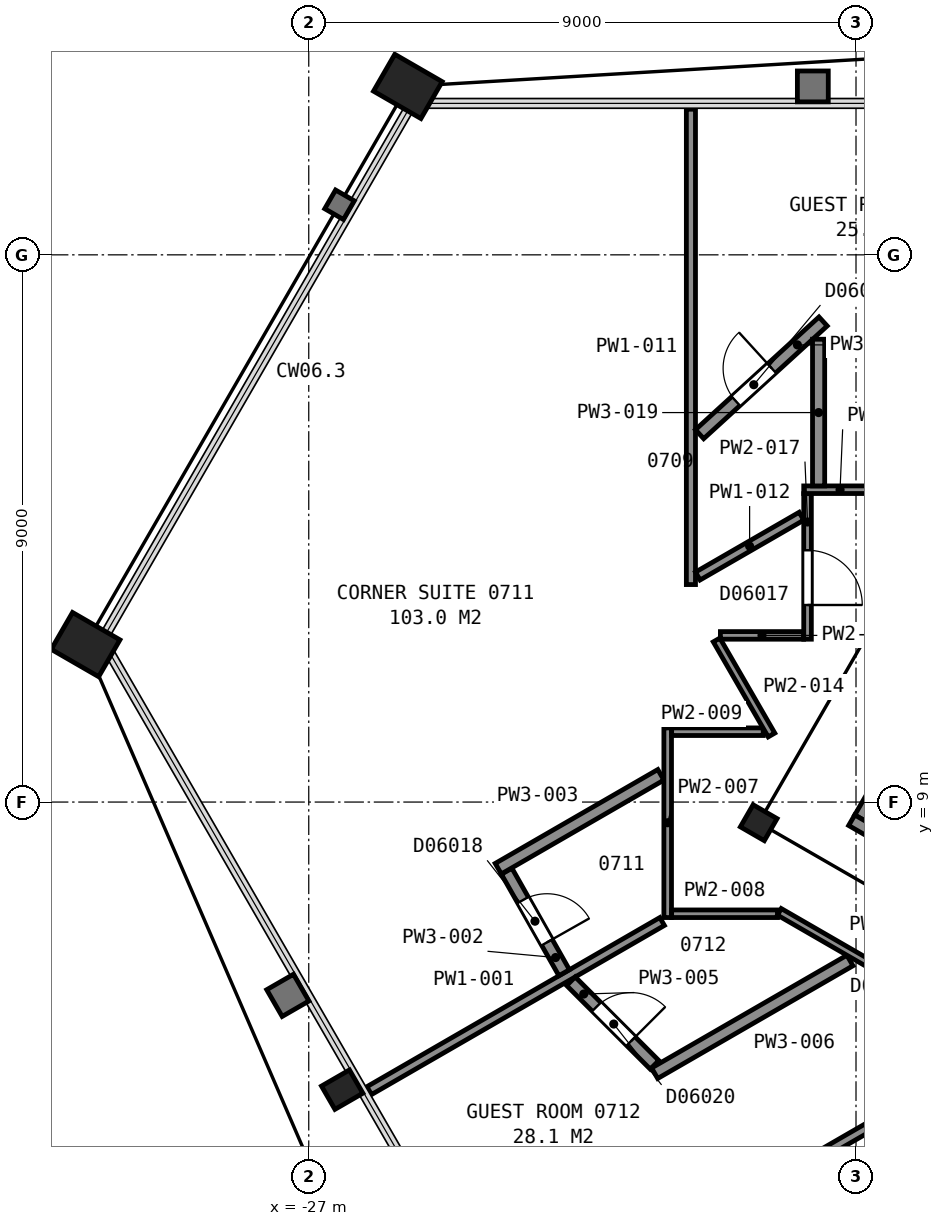
"""IFC4 building model, lengths in metres.
Left out: names, types, materials, properties, quantities, classifications, styles, units other than length and angle.
Written with IfcOpenShell. Run it as: python <this file> out.ifc"""

import sys

from ifc_helpers import new_model, si_unit, direction, frame, frame_2d, origin, origin_2d, place, context, subcontext, project, spatial, rectangle, hollow_rectangle, i_section, extrude, element, fill, save


model = new_model("IFC4")
c1 = context("Model", 3, precision=1e-05, world=origin(), true_north=direction((0.0, 1.0)))
c2 = subcontext(c1, "Body", "Model", "MODEL_VIEW")
j1 = project(units=[si_unit("LENGTHUNIT", "METRE"), si_unit("PLANEANGLEUNIT", "RADIAN")], contexts=[c1])
p1 = place(None, origin())
s1 = spatial("IfcSite", under=j1, at=p1, CompositionType="ELEMENT")
p2 = place(p1, origin())
s2 = spatial("IfcBuilding", under=s1, at=p2, CompositionType="ELEMENT")
p3 = place(p2, frame((0.0, 0.0, 40.4)))
s3 = spatial("IfcBuildingStorey", under=s2, at=p3, CompositionType="ELEMENT", Elevation=40.4)
for number, where, z_axis, x_axis in (
    (1, (-25.37, 20.77, 0.0), (0.0, 0.0, 1.0), (0.5, 0.866, 0.0)),
    (2, (-30.67, 11.59, 0.0), (0.0, 0.0, 1.0), (0.5, 0.866, 0.0)),
):
    element("IfcColumn", number, at=place(p3, frame(where, z_axis=z_axis, x_axis=x_axis)), inside=s3, PredefinedType="COLUMN", context=c2, shape_type="SweptSolid", body=[
        extrude(hollow_rectangle(XDim=0.7, YDim=0.9, WallThickness=0.065, at=origin_2d()), origin(), (0.0, 0.0, 1.0), 3.56),
    ])
p4 = place(p3, frame((-26.45, 4.27, 0.0), z_axis=(0.0, 0.0, 1.0), x_axis=(-0.5, 0.866025403784, 0.0)))
e3 = element("IfcColumn", 3, at=p4, inside=s3, PredefinedType="COLUMN", context=c2, shape_type="SweptSolid", body=[
    extrude(i_section(OverallWidth=0.442, OverallDepth=0.531, WebThickness=0.066, FlangeThickness=0.106, FilletRadius=0.015, at=origin_2d()), origin(), (0.0, 0.0, 1.0), 3.575),
])
p5 = place(p3, frame((-19.6, 8.66, 0.0), z_axis=(0.0, 0.0, 1.0), x_axis=(0.5, 0.866025403784, 0.0)))
e4 = element("IfcColumn", 4, at=p5, inside=s3, PredefinedType="COLUMN", context=c2, shape_type="SweptSolid", body=[
    extrude(i_section(OverallWidth=0.419, OverallDepth=0.455, WebThickness=0.042, FlangeThickness=0.068, FilletRadius=0.015, at=origin_2d()), origin(), (0.0, 0.0, 1.0), 3.6),
])
p6 = place(p3, frame((-16.534, 11.162, 0.0), z_axis=(0.0, 0.0, 1.0), x_axis=(-0.49998411664, -0.866034573852, 0.0)))
e5 = element("IfcWall", 5, at=p6, inside=s3, PredefinedType="PARTITIONING", context=c2, shape_type="SweptSolid", body=[
    extrude(rectangle(XDim=2.8, YDim=0.2, at=frame_2d((1.4, 0.0))), origin(), (0.0, 0.0, 1.0), 3.35),
])
p7 = place(p6, frame((0.85, 0.0, 0.0)))
e6 = element("IfcOpeningElement", 6, at=p7, cuts=e5, PredefinedType="OPENING", context=c2, shape_type="SweptSolid", body=[
    extrude(rectangle(XDim=1.1, YDim=2.1, at=frame_2d((0.55, 1.05))), frame((0.0, 0.11, 0.0), z_axis=(0.0, -1.0, 0.0), x_axis=(1.0, 0.0, 0.0)), (0.0, 0.0, 1.0), 0.22),
])
p8 = place(p3, frame((-7.678, 2.701, 0.0), z_axis=(0.0, 0.0, 1.0), x_axis=(-0.866026010844, 0.49999894854, 0.0)))
e7 = element("IfcWall", 7, at=p8, inside=s3, PredefinedType="PARTITIONING", context=c2, shape_type="SweptSolid", body=[
    extrude(rectangle(XDim=12.0, YDim=0.2, at=frame_2d((6.0, 0.0))), origin(), (0.0, 0.0, 1.0), 3.35),
])
p9 = place(p3, frame((-26.006, 4.254, 0.0), z_axis=(0.0, 0.0, 1.0), x_axis=(0.865981654797, 0.500075767815, 0.0)))
e8 = element("IfcWall", 8, at=p9, inside=s3, PredefinedType="PARTITIONING", context=c2, shape_type="SweptSolid", body=[
    extrude(rectangle(XDim=5.563, YDim=0.15, at=frame_2d((2.781, 0.0))), origin(), (0.0, 0.0, 1.0), 2.613),
])
p10 = place(p3, frame((-23.745, 7.863, 0.0), z_axis=(0.0, 0.0, 1.0), x_axis=(0.492970842961, -0.870045830971, 0.0)))
e9 = element("IfcWall", 9, at=p10, inside=s3, PredefinedType="PARTITIONING", context=c2, shape_type="SweptSolid", body=[
    extrude(rectangle(XDim=1.919, YDim=0.2, at=frame_2d((0.959, 0.0))), origin(), (0.0, 0.0, 1.0), 2.613),
])
p11 = place(p10, frame((0.545, 0.0, 0.0)))
e10 = element("IfcOpeningElement", 10, at=p11, cuts=e9, PredefinedType="OPENING", context=c2, shape_type="SweptSolid", body=[
    extrude(rectangle(XDim=0.8, YDim=2.1, at=frame_2d((0.4, 1.05))), frame((0.0, 0.11, 0.0), z_axis=(0.0, -1.0, 0.0), x_axis=(1.0, 0.0, 0.0)), (0.0, 0.0, 1.0), 0.22),
])
p12 = place(p3, frame((-23.884, 7.904, 0.0), z_axis=(0.0, 0.0, 1.0), x_axis=(0.866015731669, 0.500016752221, 0.0)))
e11 = element("IfcWall", 11, at=p12, inside=s3, PredefinedType="PARTITIONING", context=c2, shape_type="SweptSolid", body=[
    extrude(rectangle(XDim=3.088, YDim=0.2, at=frame_2d((1.544, 0.0))), origin(), (0.0, 0.0, 1.0), 2.613),
])
p13 = place(p3, frame((-23.693, 0.247, 0.0), z_axis=(0.0, 0.0, 1.0), x_axis=(0.866031705461, 0.499989085017, 0.0)))
e12 = element("IfcWall", 12, at=p13, inside=s3, PredefinedType="PARTITIONING", context=c2, shape_type="SweptSolid", body=[
    extrude(rectangle(XDim=8.587, YDim=0.15, at=frame_2d((4.293, 0.0))), origin(), (0.0, 0.0, 1.0), 2.613),
])
p14 = place(p3, frame((-22.688, 6.053, 0.0), z_axis=(0.0, 0.0, 1.0), x_axis=(0.707106781187, -0.707106781187, 0.0)))
e13 = element("IfcWall", 13, at=p14, inside=s3, PredefinedType="PARTITIONING", context=c2, shape_type="SweptSolid", body=[
    extrude(rectangle(XDim=1.944, YDim=0.2, at=frame_2d((0.972, 0.0))), origin(), (0.0, 0.0, 1.0), 2.613),
])
p15 = place(p14, frame((0.595, 0.0, 0.0)))
e14 = element("IfcOpeningElement", 14, at=p15, cuts=e13, PredefinedType="OPENING", context=c2, shape_type="SweptSolid", body=[
    extrude(rectangle(XDim=0.8, YDim=2.1, at=frame_2d((0.4, 1.05))), frame((0.0, 0.11, 0.0), z_axis=(0.0, -1.0, 0.0), x_axis=(1.0, 0.0, 0.0)), (0.0, 0.0, 1.0), 0.22),
])
p16 = place(p3, frame((-21.312, 4.54, 0.0), z_axis=(0.0, 0.0, 1.0), x_axis=(0.866071583234, 0.499920006315, 0.0)))
e15 = element("IfcWall", 15, at=p16, inside=s3, PredefinedType="PARTITIONING", context=c2, shape_type="SweptSolid", body=[
    extrude(rectangle(XDim=3.708, YDim=0.2, at=frame_2d((1.854, 0.0))), origin(), (0.0, 0.0, 1.0), 2.613),
])
p17 = place(p3, frame((-21.097, 7.101, 0.0), z_axis=(0.0, 0.0, 1.0), x_axis=(0.0, 1.0, 0.0)))
e16 = element("IfcWall", 16, at=p17, inside=s3, PredefinedType="PARTITIONING", context=c2, shape_type="SweptSolid", body=[
    extrude(rectangle(XDim=3.119, YDim=0.125, at=frame_2d((1.56, 0.0))), origin(), (0.0, 0.0, 1.0), 2.613),
])
p18 = place(p3, frame((-21.032, 7.163, 0.0), z_axis=(0.0, 0.0, 1.0), x_axis=(1.0, 0.0, 0.0)))
e17 = element("IfcWall", 17, at=p18, inside=s3, PredefinedType="PARTITIONING", context=c2, shape_type="SweptSolid", body=[
    extrude(rectangle(XDim=1.741, YDim=0.125, at=frame_2d((0.871, 0.0))), origin(), (0.0, 0.0, 1.0), 2.613),
])
p19 = place(p3, frame((-21.032, 10.157, 0.0), z_axis=(0.0, 0.0, 1.0), x_axis=(1.0, 0.0, 0.0)))
e18 = element("IfcWall", 18, at=p19, inside=s3, PredefinedType="PARTITIONING", context=c2, shape_type="SweptSolid", body=[
    extrude(rectangle(XDim=1.506, YDim=0.125, at=frame_2d((0.753, 0.0))), origin(), (0.0, 0.0, 1.0), 2.613),
])
p20 = place(p3, frame((-20.715, 12.577, 0.0), z_axis=(0.0, 0.0, 1.0), x_axis=(0.0, 1.0, 0.0)))
e19 = element("IfcWall", 19, at=p20, inside=s3, PredefinedType="PARTITIONING", context=c2, shape_type="SweptSolid", body=[
    extrude(rectangle(XDim=7.818, YDim=0.15, at=frame_2d((3.909, 0.0))), origin(), (0.0, 0.0, 1.0), 2.613),
])
p21 = place(p3, frame((-20.602, 12.717, 0.0), z_axis=(0.0, 0.0, 1.0), x_axis=(0.866121584746, 0.499833372672, 0.0)))
e20 = element("IfcWall", 20, at=p21, inside=s3, PredefinedType="PARTITIONING", context=c2, shape_type="SweptSolid", body=[
    extrude(rectangle(XDim=1.969, YDim=0.15, at=frame_2d((0.984, 0.0))), origin(), (0.0, 0.0, 1.0), 2.613),
])
p22 = place(p3, frame((-18.541, 16.905, 0.0), z_axis=(0.0, 0.0, 1.0), x_axis=(-0.738508553587, -0.674244107337, 0.0)))
e21 = element("IfcWall", 21, at=p22, inside=s3, PredefinedType="PARTITIONING", context=c2, shape_type="SweptSolid", body=[
    extrude(rectangle(XDim=2.75, YDim=0.2, at=frame_2d((1.375, 0.0))), origin(), (0.0, 0.0, 1.0), 2.613),
])
p23 = place(p22, frame((1.143, 0.0, 0.0)))
e22 = element("IfcOpeningElement", 22, at=p23, cuts=e21, PredefinedType="OPENING", context=c2, shape_type="SweptSolid", body=[
    extrude(rectangle(XDim=0.8, YDim=2.1, at=frame_2d((0.4, 1.05))), frame((0.0, 0.11, 0.0), z_axis=(0.0, -1.0, 0.0), x_axis=(1.0, 0.0, 0.0)), (0.0, 0.0, 1.0), 0.22),
])
p24 = place(p3, frame((-20.293, 11.666, 0.0), z_axis=(0.0, 0.0, 1.0), x_axis=(0.500327160669, -0.865836435071, 0.0)))
e23 = element("IfcWall", 23, at=p24, inside=s3, PredefinedType="PARTITIONING", context=c2, shape_type="SweptSolid", body=[
    extrude(rectangle(XDim=1.805, YDim=0.125, at=frame_2d((0.903, 0.0))), origin(), (0.0, 0.0, 1.0), 2.613),
])
p25 = place(p3, frame((-20.23, 11.741, 0.0), z_axis=(0.0, 0.0, 1.0), x_axis=(1.0, 0.0, 0.0)))
e24 = element("IfcWall", 24, at=p25, inside=s3, PredefinedType="PARTITIONING", context=c2, shape_type="SweptSolid", body=[
    extrude(rectangle(XDim=1.368, YDim=0.125, at=frame_2d((0.684, 0.0))), origin(), (0.0, 0.0, 1.0), 2.613),
])
p26 = place(p3, frame((-19.26, 7.194, 0.0), z_axis=(0.0, 0.0, 1.0), x_axis=(0.865944638795, -0.50013986298, 0.0)))
e25 = element("IfcWall", 25, at=p26, inside=s3, PredefinedType="PARTITIONING", context=c2, shape_type="SweptSolid", body=[
    extrude(rectangle(XDim=2.599, YDim=0.125, at=frame_2d((1.299, 0.0))), origin(), (0.0, 0.0, 1.0), 2.613),
])
p27 = place(p3, frame((-18.797, 11.678, 0.0), z_axis=(0.0, 0.0, 1.0), x_axis=(0.0, 1.0, 0.0)))
e26 = element("IfcWall", 26, at=p27, inside=s3, PredefinedType="PARTITIONING", context=c2, shape_type="SweptSolid", body=[
    extrude(rectangle(XDim=2.394, YDim=0.125, at=frame_2d((1.197, 0.0))), origin(), (0.0, 0.0, 1.0), 2.613),
])
p28 = place(p27, frame((0.562, 0.0, 0.0)))
e27 = element("IfcOpeningElement", 27, at=p28, cuts=e26, PredefinedType="OPENING", context=c2, shape_type="SweptSolid", body=[
    extrude(rectangle(XDim=0.9, YDim=2.1, at=frame_2d((0.45, 1.05))), frame((0.0, 0.073, 0.0), z_axis=(0.0, -1.0, 0.0), x_axis=(1.0, 0.0, 0.0)), (0.0, 0.0, 1.0), 0.145),
])
p29 = place(p3, frame((-18.86, 14.137, 0.0), z_axis=(0.0, 0.0, 1.0), x_axis=(1.0, 0.0, 0.0)))
e28 = element("IfcWall", 28, at=p29, inside=s3, PredefinedType="PARTITIONING", context=c2, shape_type="SweptSolid", body=[
    extrude(rectangle(XDim=3.004, YDim=0.125, at=frame_2d((1.502, 0.0))), origin(), (0.0, 0.0, 1.0), 2.613),
])
p30 = place(p29, frame((1.195, 0.0, 0.0)))
e29 = element("IfcOpeningElement", 29, at=p30, cuts=e28, PredefinedType="OPENING", context=c2, shape_type="SweptSolid", body=[
    extrude(rectangle(XDim=0.9, YDim=2.1, at=frame_2d((0.45, 1.05))), frame((0.0, 0.073, 0.0), z_axis=(0.0, -1.0, 0.0), x_axis=(1.0, 0.0, 0.0)), (0.0, 0.0, 1.0), 0.145),
])
p31 = place(p3, frame((-18.615, 14.199, 0.0), z_axis=(0.0, 0.0, 1.0), x_axis=(0.0, 1.0, 0.0)))
e30 = element("IfcWall", 30, at=p31, inside=s3, PredefinedType="PARTITIONING", context=c2, shape_type="SweptSolid", body=[
    extrude(rectangle(XDim=2.413, YDim=0.2, at=frame_2d((1.206, 0.0))), origin(), (0.0, 0.0, 1.0), 2.613),
])
p32 = place(p11, origin())
e31 = element("IfcDoor", 31, at=p32, inside=s3, OperationType="SINGLE_SWING_RIGHT", PredefinedType="DOOR", context=c2, shape_type="SweptSolid", body=[
    extrude(rectangle(XDim=0.8, YDim=2.1, at=frame_2d((0.4, 1.05))), frame((0.0, 0.025, 0.0), z_axis=(0.0, -1.0, 0.0), x_axis=(1.0, 0.0, 0.0)), (0.0, 0.0, 1.0), 0.05),
])
fill(e10, e31)
p33 = place(p15, origin())
e32 = element("IfcDoor", 32, at=p33, inside=s3, OperationType="SINGLE_SWING_RIGHT", PredefinedType="DOOR", context=c2, shape_type="SweptSolid", body=[
    extrude(rectangle(XDim=0.8, YDim=2.1, at=frame_2d((0.4, 1.05))), frame((0.0, 0.025, 0.0), z_axis=(0.0, -1.0, 0.0), x_axis=(1.0, 0.0, 0.0)), (0.0, 0.0, 1.0), 0.05),
])
fill(e14, e32)
p34 = place(p23, origin())
e33 = element("IfcDoor", 33, at=p34, inside=s3, OperationType="SINGLE_SWING_LEFT", PredefinedType="DOOR", context=c2, shape_type="SweptSolid", body=[
    extrude(rectangle(XDim=0.8, YDim=2.1, at=frame_2d((0.4, 1.05))), frame((0.0, 0.025, 0.0), z_axis=(0.0, -1.0, 0.0), x_axis=(1.0, 0.0, 0.0)), (0.0, 0.0, 1.0), 0.05),
])
fill(e22, e33)
p35 = place(p28, origin())
e34 = element("IfcDoor", 34, at=p35, inside=s3, OperationType="SINGLE_SWING_LEFT", PredefinedType="DOOR", context=c2, shape_type="SweptSolid", body=[
    extrude(rectangle(XDim=0.9, YDim=2.1, at=frame_2d((0.45, 1.05))), frame((0.0, 0.025, 0.0), z_axis=(0.0, -1.0, 0.0), x_axis=(1.0, 0.0, 0.0)), (0.0, 0.0, 1.0), 0.05),
])
fill(e27, e34)
save(model, sys.argv[1])
